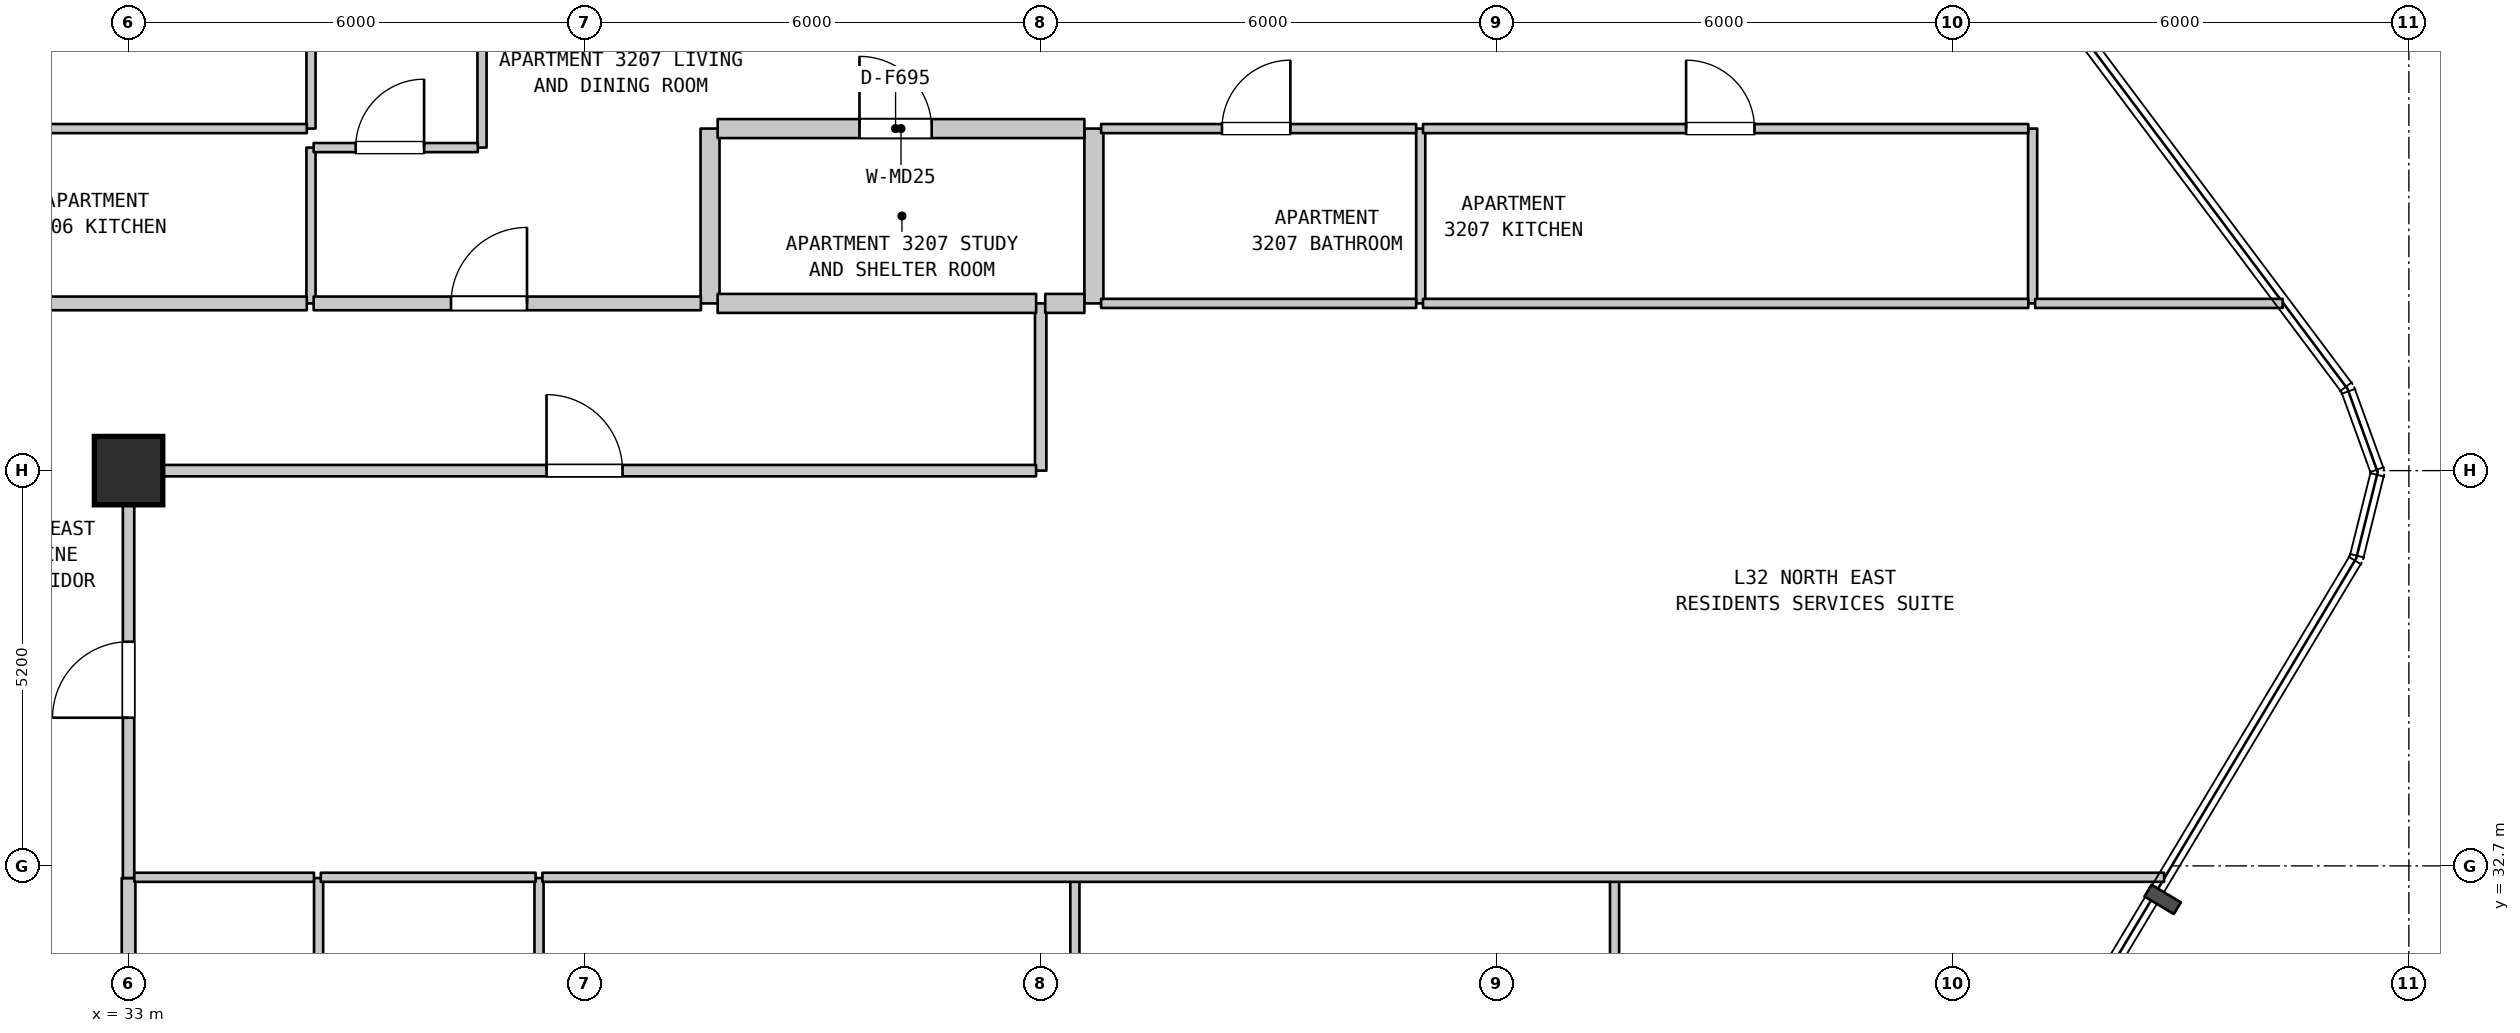
"""IFC4 building model, lengths in metres.
Left out: names, types, materials, properties, quantities, classifications, styles, units other than length and angle.
Written with IfcOpenShell. Run it as: python <this file> out.ifc"""

import sys

from ifc_helpers import new_model, si_unit, direction, frame, frame_2d, origin, origin_2d, place, context, subcontext, project, spatial, rectangle, extrude, element, fill, save


model = new_model("IFC4")
c1 = context("Model", 3, precision=1e-05, world=origin(), true_north=direction((0.0, 1.0)))
c2 = subcontext(c1, "Body", "Model", "MODEL_VIEW")
j1 = project(units=[si_unit("LENGTHUNIT", "METRE"), si_unit("PLANEANGLEUNIT", "RADIAN")], contexts=[c1])
p1 = place(None, origin())
s1 = spatial("IfcSite", under=j1, at=p1, CompositionType="ELEMENT")
p2 = place(p1, origin())
s2 = spatial("IfcBuilding", under=s1, at=p2, CompositionType="ELEMENT")
p3 = place(p2, frame((0.0, 0.0, 133.5)))
s3 = spatial("IfcBuildingStorey", under=s2, at=p3, CompositionType="ELEMENT", Elevation=133.5)
p4 = place(p3, frame((33.0, 37.9, 0.0), z_axis=(0.0, 0.0, 1.0), x_axis=(1.0, 0.0, 0.0)))
e1 = element("IfcColumn", 1, at=p4, inside=s3, PredefinedType="COLUMN", context=c2, shape_type="SweptSolid", body=[
    extrude(rectangle(XDim=0.9, YDim=0.9, at=origin_2d()), origin(), (0.0, 0.0, 1.0), 3.7),
])
p5 = place(p3, frame((33.0, 27.47, 0.0), z_axis=(0.0, 0.0, 1.0), x_axis=(0.0, 1.0, 0.0)))
e2 = element("IfcWall", 2, at=p5, inside=s3, PredefinedType="STANDARD", context=c2, shape_type="SweptSolid", body=[
    extrude(rectangle(XDim=5.07, YDim=0.18, at=frame_2d((2.535, 0.0))), origin(), (0.0, 0.0, 1.0), 2.885),
])
p6 = place(p3, frame((33.0, 32.54, 0.0), z_axis=(0.0, 0.0, 1.0), x_axis=(0.0, 1.0, 0.0)))
e3 = element("IfcWall", 3, at=p6, inside=s3, PredefinedType="STANDARD", context=c2, shape_type="SweptSolid", body=[
    extrude(rectangle(XDim=5.36, YDim=0.15, at=frame_2d((2.68, 0.0))), origin(), (0.0, 0.0, 1.0), 2.885),
])
p7 = place(p6, frame((2.109, 0.0, 0.0)))
e4 = element("IfcOpeningElement", 4, at=p7, cuts=e3, PredefinedType="OPENING", context=c2, shape_type="SweptSolid", body=[
    extrude(rectangle(XDim=1.0, YDim=2.15, at=frame_2d((0.5, 1.075))), frame((0.0, 0.085, 0.0), z_axis=(0.0, -1.0, 0.0), x_axis=(1.0, 0.0, 0.0)), (0.0, 0.0, 1.0), 0.17),
])
p8 = place(p3, frame((35.4, 40.1, 0.0), z_axis=(0.0, 0.0, 1.0), x_axis=(0.0, 1.0, 0.0)))
e5 = element("IfcWall", 5, at=p8, inside=s3, PredefinedType="PARTITIONING", context=c2, shape_type="SweptSolid", body=[
    extrude(rectangle(XDim=2.05, YDim=0.12, at=frame_2d((1.025, 0.0))), origin(), (0.0, 0.0, 1.0), 3.385),
])
p9 = place(p3, frame((35.4, 42.4, 0.0), z_axis=(0.0, 0.0, 1.0), x_axis=(0.0, 1.0, 0.0)))
e6 = element("IfcWall", 6, at=p9, inside=s3, PredefinedType="PARTITIONING", context=c2, shape_type="SweptSolid", body=[
    extrude(rectangle(XDim=2.7, YDim=0.12, at=frame_2d((1.35, 0.0))), origin(), (0.0, 0.0, 1.0), 3.385),
])
p10 = place(p3, frame((35.5, 27.47, 0.0), z_axis=(0.0, 0.0, 1.0), x_axis=(0.0, 1.0, 0.0)))
e7 = element("IfcWall", 7, at=p10, inside=s3, PredefinedType="PARTITIONING", context=c2, shape_type="SweptSolid", body=[
    extrude(rectangle(XDim=5.07, YDim=0.12, at=frame_2d((2.535, 0.0))), origin(), (0.0, 0.0, 1.0), 3.385),
])
p11 = place(p3, frame((37.65, 42.15, 0.0), z_axis=(0.0, 0.0, 1.0), x_axis=(0.0, 1.0, 0.0)))
e8 = element("IfcWall", 8, at=p11, inside=s3, PredefinedType="PARTITIONING", context=c2, shape_type="SweptSolid", body=[
    extrude(rectangle(XDim=3.15, YDim=0.12, at=frame_2d((1.575, 0.0))), origin(), (0.0, 0.0, 1.0), 3.385),
])
p12 = place(p3, frame((38.4, 27.47, 0.0), z_axis=(0.0, 0.0, 1.0), x_axis=(0.0, 1.0, 0.0)))
e9 = element("IfcWall", 9, at=p12, inside=s3, PredefinedType="PARTITIONING", context=c2, shape_type="SweptSolid", body=[
    extrude(rectangle(XDim=5.07, YDim=0.12, at=frame_2d((2.535, 0.0))), origin(), (0.0, 0.0, 1.0), 3.385),
])
p13 = place(p3, frame((40.65, 40.1, 0.0), z_axis=(0.0, 0.0, 1.0), x_axis=(0.0, 1.0, 0.0)))
e10 = element("IfcWall", 10, at=p13, inside=s3, PredefinedType="STANDARD", context=c2, shape_type="SweptSolid", body=[
    extrude(rectangle(XDim=2.3, YDim=0.25, at=frame_2d((1.15, 0.0))), origin(), (0.0, 0.0, 1.0), 3.385),
])
p14 = place(p3, frame((45.0, 37.9, 0.0), z_axis=(0.0, 0.0, 1.0), x_axis=(0.0, 1.0, 0.0)))
e11 = element("IfcWall", 11, at=p14, inside=s3, PredefinedType="STANDARD", context=c2, shape_type="SweptSolid", body=[
    extrude(rectangle(XDim=2.2, YDim=0.15, at=frame_2d((1.1, 0.0))), origin(), (0.0, 0.0, 1.0), 3.385),
])
p15 = place(p3, frame((45.45, 27.47, 0.0), z_axis=(0.0, 0.0, 1.0), x_axis=(0.0, 1.0, 0.0)))
e12 = element("IfcWall", 12, at=p15, inside=s3, PredefinedType="PARTITIONING", context=c2, shape_type="SweptSolid", body=[
    extrude(rectangle(XDim=5.07, YDim=0.12, at=frame_2d((2.535, 0.0))), origin(), (0.0, 0.0, 1.0), 3.385),
])
p16 = place(p3, frame((45.7, 40.1, 0.0), z_axis=(0.0, 0.0, 1.0), x_axis=(0.0, 1.0, 0.0)))
e13 = element("IfcWall", 13, at=p16, inside=s3, PredefinedType="STANDARD", context=c2, shape_type="SweptSolid", body=[
    extrude(rectangle(XDim=2.3, YDim=0.25, at=frame_2d((1.15, 0.0))), origin(), (0.0, 0.0, 1.0), 3.385),
])
p17 = place(p3, frame((50.0, 40.1, 0.0), z_axis=(0.0, 0.0, 1.0), x_axis=(0.0, 1.0, 0.0)))
e14 = element("IfcWall", 14, at=p17, inside=s3, PredefinedType="PARTITIONING", context=c2, shape_type="SweptSolid", body=[
    extrude(rectangle(XDim=2.3, YDim=0.12, at=frame_2d((1.15, 0.0))), origin(), (0.0, 0.0, 1.0), 3.385),
])
p18 = place(p3, frame((52.55, 27.47, 0.0), z_axis=(0.0, 0.0, 1.0), x_axis=(0.0, 1.0, 0.0)))
e15 = element("IfcWall", 15, at=p18, inside=s3, PredefinedType="PARTITIONING", context=c2, shape_type="SweptSolid", body=[
    extrude(rectangle(XDim=5.07, YDim=0.12, at=frame_2d((2.535, 0.0))), origin(), (0.0, 0.0, 1.0), 3.385),
])
p19 = place(p3, frame((58.05, 40.1, 0.0), z_axis=(0.0, 0.0, 1.0), x_axis=(0.0, 1.0, 0.0)))
e16 = element("IfcWall", 16, at=p19, inside=s3, PredefinedType="PARTITIONING", context=c2, shape_type="SweptSolid", body=[
    extrude(rectangle(XDim=2.3, YDim=0.12, at=frame_2d((1.15, 0.0))), origin(), (0.0, 0.0, 1.0), 3.385),
])
p20 = place(p3, frame((33.075, 32.55, 0.0), z_axis=(0.0, 0.0, 1.0), x_axis=(1.0, 0.0, 0.0)))
e17 = element("IfcWall", 17, at=p20, inside=s3, PredefinedType="PARTITIONING", context=c2, shape_type="SweptSolid", body=[
    extrude(rectangle(XDim=2.364, YDim=0.12, at=frame_2d((1.182, 0.0))), origin(), (0.0, 0.0, 1.0), 3.385),
])
p21 = place(p3, frame((35.529, 32.55, 0.0), z_axis=(0.0, 0.0, 1.0), x_axis=(1.0, 0.0, 0.0)))
e18 = element("IfcWall", 18, at=p21, inside=s3, PredefinedType="PARTITIONING", context=c2, shape_type="SweptSolid", body=[
    extrude(rectangle(XDim=2.826, YDim=0.12, at=frame_2d((1.413, 0.0))), origin(), (0.0, 0.0, 1.0), 3.385),
])
p22 = place(p3, frame((38.445, 32.55, 0.0), z_axis=(0.0, 0.0, 1.0), x_axis=(1.0, 0.0, 0.0)))
e19 = element("IfcWall", 19, at=p22, inside=s3, PredefinedType="PARTITIONING", context=c2, shape_type="SweptSolid", body=[
    extrude(rectangle(XDim=21.335, YDim=0.12, at=frame_2d((10.667, 0.0))), origin(), (0.0, 0.0, 1.0), 3.385),
])
p23 = place(p3, frame((33.06, 37.9, 0.0), z_axis=(0.0, 0.0, 1.0), x_axis=(1.0, 0.0, 0.0)))
e20 = element("IfcWall", 20, at=p23, inside=s3, PredefinedType="STANDARD", context=c2, shape_type="SweptSolid", body=[
    extrude(rectangle(XDim=11.879, YDim=0.15, at=frame_2d((5.939, 0.0))), origin(), (0.0, 0.0, 1.0), 3.385),
])
p24 = place(p23, frame((5.439, 0.0, 0.0)))
e21 = element("IfcOpeningElement", 21, at=p24, cuts=e20, PredefinedType="OPENING", context=c2, shape_type="SweptSolid", body=[
    extrude(rectangle(XDim=1.0, YDim=2.15, at=frame_2d((0.5, 1.075))), frame((0.0, 0.085, 0.0), z_axis=(0.0, -1.0, 0.0), x_axis=(1.0, 0.0, 0.0)), (0.0, 0.0, 1.0), 0.17),
])
p25 = place(p3, frame((29.325, 40.1, 0.0), z_axis=(0.0, 0.0, 1.0), x_axis=(1.0, 0.0, 0.0)))
e22 = element("IfcWall", 22, at=p25, inside=s3, PredefinedType="STANDARD", context=c2, shape_type="SweptSolid", body=[
    extrude(rectangle(XDim=6.02, YDim=0.18, at=frame_2d((3.01, 0.0))), origin(), (0.0, 0.0, 1.0), 3.385),
])
p26 = place(p3, frame((35.435, 40.1, 0.0), z_axis=(0.0, 0.0, 1.0), x_axis=(1.0, 0.0, 0.0)))
e23 = element("IfcWall", 23, at=p26, inside=s3, PredefinedType="STANDARD", context=c2, shape_type="SweptSolid", body=[
    extrude(rectangle(XDim=5.095, YDim=0.18, at=frame_2d((2.547, 0.0))), origin(), (0.0, 0.0, 1.0), 3.385),
])
p27 = place(p26, frame((1.807, 0.0, 0.0)))
e24 = element("IfcOpeningElement", 24, at=p27, cuts=e23, PredefinedType="OPENING", context=c2, shape_type="SweptSolid", body=[
    extrude(rectangle(XDim=1.0, YDim=2.15, at=frame_2d((0.5, 1.075))), frame((0.0, 0.1, 0.0), z_axis=(0.0, -1.0, 0.0), x_axis=(1.0, 0.0, 0.0)), (0.0, 0.0, 1.0), 0.2),
])
p28 = place(p3, frame((40.75, 40.1, 0.0), z_axis=(0.0, 0.0, 1.0), x_axis=(1.0, 0.0, 0.0)))
e25 = element("IfcWall", 25, at=p28, inside=s3, PredefinedType="STANDARD", context=c2, shape_type="SweptSolid", body=[
    extrude(rectangle(XDim=4.19, YDim=0.25, at=frame_2d((2.095, 0.0))), origin(), (0.0, 0.0, 1.0), 3.385),
])
p29 = place(p3, frame((45.06, 40.1, 0.0), z_axis=(0.0, 0.0, 1.0), x_axis=(1.0, 0.0, 0.0)))
e26 = element("IfcWall", 26, at=p29, inside=s3, PredefinedType="STANDARD", context=c2, shape_type="SweptSolid", body=[
    extrude(rectangle(XDim=0.515, YDim=0.25, at=frame_2d((0.257, 0.0))), origin(), (0.0, 0.0, 1.0), 3.385),
])
p30 = place(p3, frame((45.795, 40.1, 0.0), z_axis=(0.0, 0.0, 1.0), x_axis=(1.0, 0.0, 0.0)))
e27 = element("IfcWall", 27, at=p30, inside=s3, PredefinedType="PARTITIONING", context=c2, shape_type="SweptSolid", body=[
    extrude(rectangle(XDim=4.145, YDim=0.12, at=frame_2d((2.073, 0.0))), origin(), (0.0, 0.0, 1.0), 3.385),
])
p31 = place(p3, frame((50.03, 40.1, 0.0), z_axis=(0.0, 0.0, 1.0), x_axis=(1.0, 0.0, 0.0)))
e28 = element("IfcWall", 28, at=p31, inside=s3, PredefinedType="PARTITIONING", context=c2, shape_type="SweptSolid", body=[
    extrude(rectangle(XDim=7.963, YDim=0.12, at=frame_2d((3.981, 0.0))), origin(), (0.0, 0.0, 1.0), 3.385),
])
p32 = place(p3, frame((58.083, 40.1, 0.0), z_axis=(0.0, 0.0, 1.0), x_axis=(1.0, 0.0, 0.0)))
e29 = element("IfcWall", 29, at=p32, inside=s3, PredefinedType="PARTITIONING", context=c2, shape_type="SweptSolid", body=[
    extrude(rectangle(XDim=3.257, YDim=0.12, at=frame_2d((1.628, 0.0))), origin(), (0.0, 0.0, 1.0), 3.385),
])
p33 = place(p3, frame((35.435, 42.15, 0.0), z_axis=(0.0, 0.0, 1.0), x_axis=(1.0, 0.0, 0.0)))
e30 = element("IfcWall", 30, at=p33, inside=s3, PredefinedType="PARTITIONING", context=c2, shape_type="SweptSolid", body=[
    extrude(rectangle(XDim=2.16, YDim=0.12, at=frame_2d((1.08, 0.0))), origin(), (0.0, 0.0, 1.0), 3.385),
])
p34 = place(p33, frame((0.553, 0.0, 0.0)))
e31 = element("IfcOpeningElement", 31, at=p34, cuts=e30, PredefinedType="OPENING", context=c2, shape_type="SweptSolid", body=[
    extrude(rectangle(XDim=0.9, YDim=2.15, at=frame_2d((0.45, 1.075))), frame((0.0, 0.07, 0.0), z_axis=(0.0, -1.0, 0.0), x_axis=(1.0, 0.0, 0.0)), (0.0, 0.0, 1.0), 0.14),
])
p35 = place(p3, frame((29.325, 42.4, 0.0), z_axis=(0.0, 0.0, 1.0), x_axis=(1.0, 0.0, 0.0)))
e32 = element("IfcWall", 32, at=p35, inside=s3, PredefinedType="PARTITIONING", context=c2, shape_type="SweptSolid", body=[
    extrude(rectangle(XDim=6.02, YDim=0.12, at=frame_2d((3.01, 0.0))), origin(), (0.0, 0.0, 1.0), 3.385),
])
p36 = place(p3, frame((40.75, 42.4, 0.0), z_axis=(0.0, 0.0, 1.0), x_axis=(1.0, 0.0, 0.0)))
e33 = element("IfcWall", 33, at=p36, inside=s3, PredefinedType="STANDARD", context=c2, shape_type="SweptSolid", body=[
    extrude(rectangle(XDim=4.825, YDim=0.25, at=frame_2d((2.413, 0.0))), origin(), (0.0, 0.0, 1.0), 3.385),
])
p37 = place(p36, frame((1.866, 0.0, 0.0)))
e34 = element("IfcOpeningElement", 34, at=p37, cuts=e33, PredefinedType="OPENING", context=c2, shape_type="SweptSolid", body=[
    extrude(rectangle(XDim=0.95, YDim=2.15, at=frame_2d((0.475, 1.075))), frame((0.0, 0.135, 0.0), z_axis=(0.0, -1.0, 0.0), x_axis=(1.0, 0.0, 0.0)), (0.0, 0.0, 1.0), 0.27),
])
p38 = place(p3, frame((45.795, 42.4, 0.0), z_axis=(0.0, 0.0, 1.0), x_axis=(1.0, 0.0, 0.0)))
e35 = element("IfcWall", 35, at=p38, inside=s3, PredefinedType="PARTITIONING", context=c2, shape_type="SweptSolid", body=[
    extrude(rectangle(XDim=4.145, YDim=0.12, at=frame_2d((2.073, 0.0))), origin(), (0.0, 0.0, 1.0), 3.385),
])
p39 = place(p38, frame((1.59, 0.0, 0.0)))
e36 = element("IfcOpeningElement", 36, at=p39, cuts=e35, PredefinedType="OPENING", context=c2, shape_type="SweptSolid", body=[
    extrude(rectangle(XDim=0.9, YDim=2.1, at=frame_2d((0.45, 1.05))), frame((0.0, 0.07, 0.0), z_axis=(0.0, -1.0, 0.0), x_axis=(1.0, 0.0, 0.0)), (0.0, 0.0, 1.0), 0.14),
])
p40 = place(p3, frame((50.03, 42.4, 0.0), z_axis=(0.0, 0.0, 1.0), x_axis=(1.0, 0.0, 0.0)))
e37 = element("IfcWall", 37, at=p40, inside=s3, PredefinedType="PARTITIONING", context=c2, shape_type="SweptSolid", body=[
    extrude(rectangle(XDim=7.963, YDim=0.12, at=frame_2d((3.981, 0.0))), origin(), (0.0, 0.0, 1.0), 3.385),
])
p41 = place(p40, frame((3.461, 0.0, 0.0)))
e38 = element("IfcOpeningElement", 38, at=p41, cuts=e37, PredefinedType="OPENING", context=c2, shape_type="SweptSolid", body=[
    extrude(rectangle(XDim=0.9, YDim=2.15, at=frame_2d((0.45, 1.075))), frame((0.0, 0.07, 0.0), z_axis=(0.0, -1.0, 0.0), x_axis=(1.0, 0.0, 0.0)), (0.0, 0.0, 1.0), 0.14),
])
p42 = place(p7, origin())
e39 = element("IfcDoor", 39, at=p42, inside=s3, OperationType="SINGLE_SWING_LEFT", PredefinedType="DOOR", context=c2, shape_type="SweptSolid", body=[
    extrude(rectangle(XDim=1.0, YDim=2.15, at=frame_2d((0.5, 1.075))), frame((0.0, 0.025, 0.0), z_axis=(0.0, -1.0, 0.0), x_axis=(1.0, 0.0, 0.0)), (0.0, 0.0, 1.0), 0.05),
])
fill(e4, e39)
p43 = place(p24, origin())
e40 = element("IfcDoor", 40, at=p43, inside=s3, OperationType="SINGLE_SWING_LEFT", PredefinedType="DOOR", context=c2, shape_type="SweptSolid", body=[
    extrude(rectangle(XDim=1.0, YDim=2.15, at=frame_2d((0.5, 1.075))), frame((0.0, 0.025, 0.0), z_axis=(0.0, -1.0, 0.0), x_axis=(1.0, 0.0, 0.0)), (0.0, 0.0, 1.0), 0.05),
])
fill(e21, e40)
p44 = place(p27, origin())
e41 = element("IfcDoor", 41, at=p44, inside=s3, OperationType="SINGLE_SWING_RIGHT", PredefinedType="DOOR", context=c2, shape_type="SweptSolid", body=[
    extrude(rectangle(XDim=1.0, YDim=2.15, at=frame_2d((0.5, 1.075))), frame((0.0, 0.025, 0.0), z_axis=(0.0, -1.0, 0.0), x_axis=(1.0, 0.0, 0.0)), (0.0, 0.0, 1.0), 0.05),
])
fill(e24, e41)
p45 = place(p34, origin())
e42 = element("IfcDoor", 42, at=p45, inside=s3, OperationType="SINGLE_SWING_RIGHT", PredefinedType="DOOR", context=c2, shape_type="SweptSolid", body=[
    extrude(rectangle(XDim=0.9, YDim=2.15, at=frame_2d((0.45, 1.075))), frame((0.0, 0.025, 0.0), z_axis=(0.0, -1.0, 0.0), x_axis=(1.0, 0.0, 0.0)), (0.0, 0.0, 1.0), 0.05),
])
fill(e31, e42)
p46 = place(p37, origin())
e43 = element("IfcDoor", 43, at=p46, inside=s3, OperationType="SINGLE_SWING_LEFT", PredefinedType="DOOR", context=c2, shape_type="SweptSolid", body=[
    extrude(rectangle(XDim=0.95, YDim=2.15, at=frame_2d((0.475, 1.075))), frame((0.0, 0.025, 0.0), z_axis=(0.0, -1.0, 0.0), x_axis=(1.0, 0.0, 0.0)), (0.0, 0.0, 1.0), 0.05),
])
fill(e34, e43)
p47 = place(p39, origin())
e44 = element("IfcDoor", 44, at=p47, inside=s3, OperationType="SINGLE_SWING_RIGHT", PredefinedType="DOOR", context=c2, shape_type="SweptSolid", body=[
    extrude(rectangle(XDim=0.9, YDim=2.1, at=frame_2d((0.45, 1.05))), frame((0.0, 0.025, 0.0), z_axis=(0.0, -1.0, 0.0), x_axis=(1.0, 0.0, 0.0)), (0.0, 0.0, 1.0), 0.05),
])
fill(e36, e44)
p48 = place(p41, origin())
e45 = element("IfcDoor", 45, at=p48, inside=s3, OperationType="SINGLE_SWING_LEFT", PredefinedType="DOOR", context=c2, shape_type="SweptSolid", body=[
    extrude(rectangle(XDim=0.9, YDim=2.15, at=frame_2d((0.45, 1.075))), frame((0.0, 0.025, 0.0), z_axis=(0.0, -1.0, 0.0), x_axis=(1.0, 0.0, 0.0)), (0.0, 0.0, 1.0), 0.05),
])
fill(e38, e45)
save(model, sys.argv[1])
